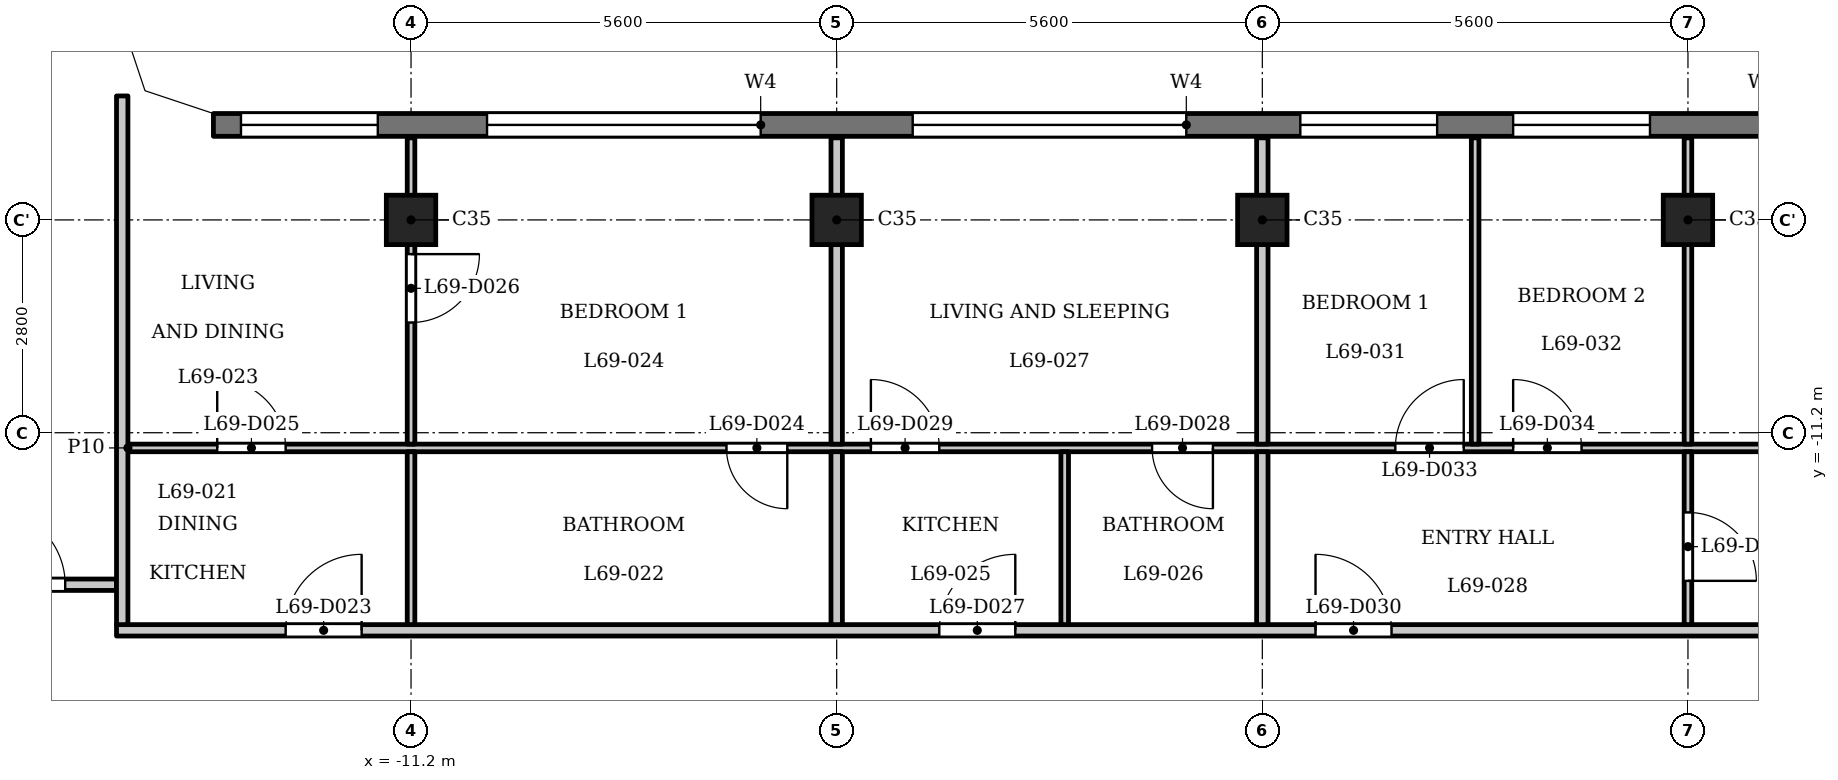
"""IFC4 building model, lengths in metres.
Left out: names, types, materials, properties, quantities, classifications, styles, units other than length and angle.
Written with IfcOpenShell. Run it as: python <this file> out.ifc"""

import sys

from ifc_helpers import new_model, si_unit, direction, frame, frame_2d, origin, origin_2d, place, context, subcontext, project, spatial, polyline, rectangle, outline, extrude, element, fill, save


model = new_model("IFC4")
c1 = context("Model", 3, precision=1e-05, world=origin(), true_north=direction((0.0, 1.0)))
c2 = subcontext(c1, "Body", "Model", "MODEL_VIEW")
j1 = project(units=[si_unit("LENGTHUNIT", "METRE"), si_unit("PLANEANGLEUNIT", "RADIAN")], contexts=[c1])
p1 = place(None, origin())
s1 = spatial("IfcSite", under=j1, at=p1, CompositionType="ELEMENT")
p2 = place(p1, origin())
s2 = spatial("IfcBuilding", under=s1, at=p2, CompositionType="ELEMENT")
p3 = place(p2, frame((0.0, 0.0, 266.2)))
s3 = spatial("IfcBuildingStorey", under=s2, at=p3, CompositionType="ELEMENT", Elevation=266.2)
for number, where, z_axis, x_axis in (
    (1, (-11.2, -8.4, 0.0), (0.0, 0.0, 1.0), (1.0, 0.0, 0.0)),
    (2, (-5.6, -8.4, 0.0), (0.0, 0.0, 1.0), (1.0, 0.0, 0.0)),
    (3, (0.0, -8.4, 0.0), (0.0, 0.0, 1.0), (1.0, 0.0, 0.0)),
    (4, (5.6, -8.4, 0.0), (0.0, 0.0, 1.0), (1.0, 0.0, 0.0)),
):
    element("IfcColumn", number, at=place(p3, frame(where, z_axis=z_axis, x_axis=x_axis)), inside=s3, PredefinedType="COLUMN", context=c2, shape_type="SweptSolid", body=[
        extrude(rectangle(XDim=0.65, YDim=0.65, at=origin_2d()), origin(), (0.0, 0.0, 1.0), 3.5),
    ])
p4 = place(p3, frame((13.8, -7.15, 0.0), z_axis=(0.0, 0.0, 1.0), x_axis=(-1.0, 0.0, 0.0)))
e5 = element("IfcWall", 5, at=p4, inside=s3, PredefinedType="SOLIDWALL", context=c2, shape_type="SweptSolid", body=[
    extrude(rectangle(XDim=27.6, YDim=0.3, at=frame_2d((13.8, 0.0))), origin(), (0.0, 0.0, 1.0), 3.2),
])
p5 = place(p4, frame((0.363, 0.0, 0.9)))
e6 = element("IfcOpeningElement", 6, at=p5, cuts=e5, PredefinedType="OPENING", context=c2, shape_type="SweptSolid", body=[
    extrude(rectangle(XDim=1.8, YDim=1.25, at=frame_2d((0.9, 0.625))), frame((0.0, 0.16, 0.0), z_axis=(0.0, -1.0, 0.0), x_axis=(1.0, 0.0, 0.0)), (0.0, 0.0, 1.0), 0.32),
])
p6 = place(p4, frame((3.6, 0.0, 1.2)))
e7 = element("IfcOpeningElement", 7, at=p6, cuts=e5, PredefinedType="OPENING", context=c2, shape_type="SweptSolid", body=[
    extrude(rectangle(XDim=3.6, YDim=0.95, at=frame_2d((1.8, 0.475))), frame((0.0, 0.16, 0.0), z_axis=(0.0, -1.0, 0.0), x_axis=(1.0, 0.0, 0.0)), (0.0, 0.0, 1.0), 0.32),
])
p7 = place(p4, frame((8.7, 0.0, 0.9)))
e8 = element("IfcOpeningElement", 8, at=p7, cuts=e5, PredefinedType="OPENING", context=c2, shape_type="SweptSolid", body=[
    extrude(rectangle(XDim=1.8, YDim=1.25, at=frame_2d((0.9, 0.625))), frame((0.0, 0.16, 0.0), z_axis=(0.0, -1.0, 0.0), x_axis=(1.0, 0.0, 0.0)), (0.0, 0.0, 1.0), 0.32),
])
p8 = place(p4, frame((11.5, 0.0, 0.9)))
e9 = element("IfcOpeningElement", 9, at=p8, cuts=e5, PredefinedType="OPENING", context=c2, shape_type="SweptSolid", body=[
    extrude(rectangle(XDim=1.8, YDim=1.25, at=frame_2d((0.9, 0.625))), frame((0.0, 0.16, 0.0), z_axis=(0.0, -1.0, 0.0), x_axis=(1.0, 0.0, 0.0)), (0.0, 0.0, 1.0), 0.32),
])
p9 = place(p4, frame((14.8, 0.0, 1.2)))
e10 = element("IfcOpeningElement", 10, at=p9, cuts=e5, PredefinedType="OPENING", context=c2, shape_type="SweptSolid", body=[
    extrude(rectangle(XDim=3.6, YDim=0.95, at=frame_2d((1.8, 0.475))), frame((0.0, 0.16, 0.0), z_axis=(0.0, -1.0, 0.0), x_axis=(1.0, 0.0, 0.0)), (0.0, 0.0, 1.0), 0.32),
])
p10 = place(p4, frame((20.4, 0.0, 1.2)))
e11 = element("IfcOpeningElement", 11, at=p10, cuts=e5, PredefinedType="OPENING", context=c2, shape_type="SweptSolid", body=[
    extrude(rectangle(XDim=3.6, YDim=0.95, at=frame_2d((1.8, 0.475))), frame((0.0, 0.16, 0.0), z_axis=(0.0, -1.0, 0.0), x_axis=(1.0, 0.0, 0.0)), (0.0, 0.0, 1.0), 0.32),
])
p11 = place(p4, frame((25.438, 0.0, 0.9)))
e12 = element("IfcOpeningElement", 12, at=p11, cuts=e5, PredefinedType="OPENING", context=c2, shape_type="SweptSolid", body=[
    extrude(rectangle(XDim=1.8, YDim=1.25, at=frame_2d((0.9, 0.625))), frame((0.0, 0.16, 0.0), z_axis=(0.0, -1.0, 0.0), x_axis=(1.0, 0.0, 0.0)), (0.0, 0.0, 1.0), 0.32),
])
p12 = place(p3, frame((-15.075, -13.8, 0.0), z_axis=(0.0, 0.0, 1.0), x_axis=(1.0, 0.0, 0.0)))
e13 = element("IfcWall", 13, at=p12, inside=s3, PredefinedType="PARTITIONING", context=c2, shape_type="SweptSolid", body=[
    extrude(rectangle(XDim=30.15, YDim=0.15, at=frame_2d((15.075, 0.0))), origin(), (0.0, 0.0, 1.0), 3.2),
])
p13 = place(p12, frame((2.225, 0.0, 0.0)))
e14 = element("IfcOpeningElement", 14, at=p13, cuts=e13, PredefinedType="OPENING", context=c2, shape_type="SweptSolid", body=[
    extrude(rectangle(XDim=1.0, YDim=2.1, at=frame_2d((0.5, 1.05))), frame((0.0, 0.085, 0.0), z_axis=(0.0, -1.0, 0.0), x_axis=(1.0, 0.0, 0.0)), (0.0, 0.0, 1.0), 0.17),
])
p14 = place(p12, frame((10.825, 0.0, 0.0)))
e15 = element("IfcOpeningElement", 15, at=p14, cuts=e13, PredefinedType="OPENING", context=c2, shape_type="SweptSolid", body=[
    extrude(rectangle(XDim=1.0, YDim=2.1, at=frame_2d((0.5, 1.05))), frame((0.0, 0.085, 0.0), z_axis=(0.0, -1.0, 0.0), x_axis=(1.0, 0.0, 0.0)), (0.0, 0.0, 1.0), 0.17),
])
p15 = place(p12, frame((15.775, 0.0, 0.0)))
e16 = element("IfcOpeningElement", 16, at=p15, cuts=e13, PredefinedType="OPENING", context=c2, shape_type="SweptSolid", body=[
    extrude(rectangle(XDim=1.0, YDim=2.1, at=frame_2d((0.5, 1.05))), frame((0.0, 0.085, 0.0), z_axis=(0.0, -1.0, 0.0), x_axis=(1.0, 0.0, 0.0)), (0.0, 0.0, 1.0), 0.17),
])
p16 = place(p3, frame((-17.4, -13.2, 0.0), z_axis=(0.0, 0.0, 1.0), x_axis=(1.0, 0.0, 0.0)))
e17 = element("IfcWall", 17, at=p16, inside=s3, PredefinedType="PARTITIONING", context=c2, shape_type="SweptSolid", body=[
    extrude(rectangle(XDim=2.325, YDim=0.15, at=frame_2d((1.163, 0.0))), origin(), (0.0, 0.0, 1.0), 3.2),
])
p17 = place(p16, frame((0.65, 0.0, 0.0)))
e18 = element("IfcOpeningElement", 18, at=p17, cuts=e17, PredefinedType="OPENING", context=c2, shape_type="SweptSolid", body=[
    extrude(rectangle(XDim=1.0, YDim=2.1, at=frame_2d((0.5, 1.05))), frame((0.0, 0.085, 0.0), z_axis=(0.0, -1.0, 0.0), x_axis=(1.0, 0.0, 0.0)), (0.0, 0.0, 1.0), 0.17),
])
p18 = place(p3, frame((-14.925, -11.4, 0.0), z_axis=(0.0, 0.0, 1.0), x_axis=(1.0, 0.0, 0.0)))
e19 = element("IfcWall", 19, at=p18, inside=s3, PredefinedType="PARTITIONING", context=c2, shape_type="SweptSolid", body=[
    extrude(rectangle(XDim=29.85, YDim=0.1, at=frame_2d((14.925, 0.0))), origin(), (0.0, 0.0, 1.0), 3.2),
])
p19 = place(p18, frame((7.875, 0.0, 0.0)))
e20 = element("IfcOpeningElement", 20, at=p19, cuts=e19, PredefinedType="OPENING", context=c2, shape_type="SweptSolid", body=[
    extrude(rectangle(XDim=0.8, YDim=2.1, at=frame_2d((0.4, 1.05))), frame((0.0, 0.06, 0.0), z_axis=(0.0, -1.0, 0.0), x_axis=(1.0, 0.0, 0.0)), (0.0, 0.0, 1.0), 0.12),
])
p20 = place(p18, frame((1.175, 0.0, 0.0)))
e21 = element("IfcOpeningElement", 21, at=p20, cuts=e19, PredefinedType="OPENING", context=c2, shape_type="SweptSolid", body=[
    extrude(rectangle(XDim=0.9, YDim=2.1, at=frame_2d((0.45, 1.05))), frame((0.0, 0.06, 0.0), z_axis=(0.0, -1.0, 0.0), x_axis=(1.0, 0.0, 0.0)), (0.0, 0.0, 1.0), 0.12),
])
p21 = place(p18, frame((13.475, 0.0, 0.0)))
e22 = element("IfcOpeningElement", 22, at=p21, cuts=e19, PredefinedType="OPENING", context=c2, shape_type="SweptSolid", body=[
    extrude(rectangle(XDim=0.8, YDim=2.1, at=frame_2d((0.4, 1.05))), frame((0.0, 0.06, 0.0), z_axis=(0.0, -1.0, 0.0), x_axis=(1.0, 0.0, 0.0)), (0.0, 0.0, 1.0), 0.12),
])
p22 = place(p18, frame((9.775, 0.0, 0.0)))
e23 = element("IfcOpeningElement", 23, at=p22, cuts=e19, PredefinedType="OPENING", context=c2, shape_type="SweptSolid", body=[
    extrude(rectangle(XDim=0.9, YDim=2.1, at=frame_2d((0.45, 1.05))), frame((0.0, 0.06, 0.0), z_axis=(0.0, -1.0, 0.0), x_axis=(1.0, 0.0, 0.0)), (0.0, 0.0, 1.0), 0.12),
])
p23 = place(p18, frame((16.675, 0.0, 0.0)))
e24 = element("IfcOpeningElement", 24, at=p23, cuts=e19, PredefinedType="OPENING", context=c2, shape_type="SweptSolid", body=[
    extrude(rectangle(XDim=0.9, YDim=2.1, at=frame_2d((0.45, 1.05))), frame((0.0, 0.06, 0.0), z_axis=(0.0, -1.0, 0.0), x_axis=(1.0, 0.0, 0.0)), (0.0, 0.0, 1.0), 0.12),
])
p24 = place(p18, frame((18.225, 0.0, 0.0)))
e25 = element("IfcOpeningElement", 25, at=p24, cuts=e19, PredefinedType="OPENING", context=c2, shape_type="SweptSolid", body=[
    extrude(rectangle(XDim=0.9, YDim=2.1, at=frame_2d((0.45, 1.05))), frame((0.0, 0.06, 0.0), z_axis=(0.0, -1.0, 0.0), x_axis=(1.0, 0.0, 0.0)), (0.0, 0.0, 1.0), 0.12),
])
p25 = place(p18, frame((24.325, 0.0, 0.0)))
e26 = element("IfcOpeningElement", 26, at=p25, cuts=e19, PredefinedType="OPENING", context=c2, shape_type="SweptSolid", body=[
    extrude(rectangle(XDim=0.9, YDim=2.1, at=frame_2d((0.45, 1.05))), frame((0.0, 0.06, 0.0), z_axis=(0.0, -1.0, 0.0), x_axis=(1.0, 0.0, 0.0)), (0.0, 0.0, 1.0), 0.12),
])
p26 = place(p3, frame((-15.0, -13.725, 0.0), z_axis=(0.0, 0.0, 1.0), x_axis=(0.0, 1.0, 0.0)))
e27 = element("IfcWall", 27, at=p26, inside=s3, PredefinedType="PARTITIONING", context=c2, shape_type="SweptSolid", body=[
    extrude(rectangle(XDim=6.956, YDim=0.15, at=frame_2d((3.478, 0.0))), origin(), (0.0, 0.0, 1.0), 3.2),
])
p27 = place(p3, frame((-11.2, -13.725, 0.0), z_axis=(0.0, 0.0, 1.0), x_axis=(0.0, 1.0, 0.0)))
e28 = element("IfcWall", 28, at=p27, inside=s3, PredefinedType="PARTITIONING", context=c2, shape_type="SweptSolid", body=[
    extrude(rectangle(XDim=2.275, YDim=0.1, at=frame_2d((1.138, 0.0))), origin(), (0.0, 0.0, 1.0), 3.2),
])
p28 = place(p3, frame((-11.2, -11.35, 0.0), z_axis=(0.0, 0.0, 1.0), x_axis=(0.0, 1.0, 0.0)))
e29 = element("IfcWall", 29, at=p28, inside=s3, PredefinedType="PARTITIONING", context=c2, shape_type="SweptSolid", body=[
    extrude(rectangle(XDim=4.03, YDim=0.1, at=frame_2d((2.015, 0.0))), origin(), (0.0, 0.0, 1.0), 3.2),
])
p29 = place(p28, frame((1.6, 0.0, 0.0)))
e30 = element("IfcOpeningElement", 30, at=p29, cuts=e29, PredefinedType="OPENING", context=c2, shape_type="SweptSolid", body=[
    extrude(rectangle(XDim=0.9, YDim=2.1, at=frame_2d((0.45, 1.05))), frame((0.0, 0.06, 0.0), z_axis=(0.0, -1.0, 0.0), x_axis=(1.0, 0.0, 0.0)), (0.0, 0.0, 1.0), 0.12),
])
p30 = place(p3, frame((-5.6, -13.725, 0.0), z_axis=(0.0, 0.0, 1.0), x_axis=(0.0, 1.0, 0.0)))
e31 = element("IfcWall", 31, at=p30, inside=s3, PredefinedType="PARTITIONING", context=c2, shape_type="SweptSolid", body=[
    extrude(rectangle(XDim=2.275, YDim=0.15, at=frame_2d((1.138, 0.0))), origin(), (0.0, 0.0, 1.0), 3.2),
])
p31 = place(p3, frame((-5.6, -11.35, 0.0), z_axis=(0.0, 0.0, 1.0), x_axis=(0.0, 1.0, 0.0)))
e32 = element("IfcWall", 32, at=p31, inside=s3, PredefinedType="PARTITIONING", context=c2, shape_type="SweptSolid", body=[
    extrude(rectangle(XDim=4.03, YDim=0.15, at=frame_2d((2.015, 0.0))), origin(), (0.0, 0.0, 1.0), 3.2),
])
p32 = place(p3, frame((-2.6, -13.725, 0.0), z_axis=(0.0, 0.0, 1.0), x_axis=(0.0, 1.0, 0.0)))
e33 = element("IfcWall", 33, at=p32, inside=s3, PredefinedType="PARTITIONING", context=c2, shape_type="SweptSolid", body=[
    extrude(rectangle(XDim=2.275, YDim=0.1, at=frame_2d((1.138, 0.0))), origin(), (0.0, 0.0, 1.0), 3.2),
])
p33 = place(p3, frame((0.0, -13.725, 0.0), z_axis=(0.0, 0.0, 1.0), x_axis=(0.0, 1.0, 0.0)))
e34 = element("IfcWall", 34, at=p33, inside=s3, PredefinedType="PARTITIONING", context=c2, shape_type="SweptSolid", body=[
    extrude(rectangle(XDim=2.275, YDim=0.15, at=frame_2d((1.138, 0.0))), origin(), (0.0, 0.0, 1.0), 3.2),
])
p34 = place(p3, frame((0.0, -11.35, 0.0), z_axis=(0.0, 0.0, 1.0), x_axis=(0.0, 1.0, 0.0)))
e35 = element("IfcWall", 35, at=p34, inside=s3, PredefinedType="PARTITIONING", context=c2, shape_type="SweptSolid", body=[
    extrude(rectangle(XDim=4.03, YDim=0.15, at=frame_2d((2.015, 0.0))), origin(), (0.0, 0.0, 1.0), 3.2),
])
p35 = place(p3, frame((2.8, -11.35, 0.0), z_axis=(0.0, 0.0, 1.0), x_axis=(0.0, 1.0, 0.0)))
e36 = element("IfcWall", 36, at=p35, inside=s3, PredefinedType="PARTITIONING", context=c2, shape_type="SweptSolid", body=[
    extrude(rectangle(XDim=4.03, YDim=0.1, at=frame_2d((2.015, 0.0))), origin(), (0.0, 0.0, 1.0), 3.2),
])
p36 = place(p3, frame((5.6, -13.725, 0.0), z_axis=(0.0, 0.0, 1.0), x_axis=(0.0, 1.0, 0.0)))
e37 = element("IfcWall", 37, at=p36, inside=s3, PredefinedType="PARTITIONING", context=c2, shape_type="SweptSolid", body=[
    extrude(rectangle(XDim=2.275, YDim=0.1, at=frame_2d((1.138, 0.0))), origin(), (0.0, 0.0, 1.0), 3.2),
])
p37 = place(p36, frame((0.576, 0.0, 0.0)))
e38 = element("IfcOpeningElement", 38, at=p37, cuts=e37, PredefinedType="OPENING", context=c2, shape_type="SweptSolid", body=[
    extrude(rectangle(XDim=0.9, YDim=2.1, at=frame_2d((0.45, 1.05))), frame((0.0, 0.06, 0.0), z_axis=(0.0, -1.0, 0.0), x_axis=(1.0, 0.0, 0.0)), (0.0, 0.0, 1.0), 0.12),
])
p38 = place(p3, frame((5.6, -11.35, 0.0), z_axis=(0.0, 0.0, 1.0), x_axis=(0.0, 1.0, 0.0)))
e39 = element("IfcWall", 39, at=p38, inside=s3, PredefinedType="PARTITIONING", context=c2, shape_type="SweptSolid", body=[
    extrude(rectangle(XDim=4.03, YDim=0.1, at=frame_2d((2.015, 0.0))), origin(), (0.0, 0.0, 1.0), 3.2),
])
p39 = place(p3, origin())
e40 = element("IfcWall", 40, at=p39, inside=s3, PredefinedType="SOLIDWALL", context=c2, shape_type="SweptSolid", body=[
    extrude(outline(polyline([(-14.937, -6.937), (-13.849, -7.3), (-13.8, -7.3), (-13.8, -7.0), (-14.7, -6.7), (-15.0, -5.8), (-15.3, -5.8), (-15.3, -5.849), (-14.937, -6.937)])), origin(), (0.0, 0.0, 1.0), 3.2),
])
p40 = place(p17, origin())
e41 = element("IfcDoor", 41, at=p40, inside=s3, OperationType="SINGLE_SWING_RIGHT", PredefinedType="DOOR", context=c2, shape_type="SweptSolid", body=[
    extrude(rectangle(XDim=1.0, YDim=2.1, at=frame_2d((0.5, 1.05))), frame((0.0, 0.025, 0.0), z_axis=(0.0, -1.0, 0.0), x_axis=(1.0, 0.0, 0.0)), (0.0, 0.0, 1.0), 0.05),
])
fill(e18, e41)
p41 = place(p13, origin())
e42 = element("IfcDoor", 42, at=p41, inside=s3, OperationType="SINGLE_SWING_LEFT", PredefinedType="DOOR", context=c2, shape_type="SweptSolid", body=[
    extrude(rectangle(XDim=1.0, YDim=2.1, at=frame_2d((0.5, 1.05))), frame((0.0, 0.025, 0.0), z_axis=(0.0, -1.0, 0.0), x_axis=(1.0, 0.0, 0.0)), (0.0, 0.0, 1.0), 0.05),
])
fill(e14, e42)
p42 = place(p19, origin())
e43 = element("IfcDoor", 43, at=p42, inside=s3, OperationType="SINGLE_SWING_RIGHT", PredefinedType="DOOR", context=c2, shape_type="SweptSolid", body=[
    extrude(rectangle(XDim=0.8, YDim=2.1, at=frame_2d((0.4, 1.05))), frame((0.0, 0.025, 0.0), z_axis=(0.0, -1.0, 0.0), x_axis=(1.0, 0.0, 0.0)), (0.0, 0.0, 1.0), 0.05),
])
fill(e20, e43)
p43 = place(p20, origin())
e44 = element("IfcDoor", 44, at=p43, inside=s3, OperationType="SINGLE_SWING_RIGHT", PredefinedType="DOOR", context=c2, shape_type="SweptSolid", body=[
    extrude(rectangle(XDim=0.9, YDim=2.1, at=frame_2d((0.45, 1.05))), frame((0.0, 0.025, 0.0), z_axis=(0.0, -1.0, 0.0), x_axis=(1.0, 0.0, 0.0)), (0.0, 0.0, 1.0), 0.05),
])
fill(e21, e44)
p44 = place(p29, origin())
e45 = element("IfcDoor", 45, at=p44, inside=s3, OperationType="SINGLE_SWING_RIGHT", PredefinedType="DOOR", context=c2, shape_type="SweptSolid", body=[
    extrude(rectangle(XDim=0.9, YDim=2.1, at=frame_2d((0.45, 1.05))), frame((0.0, 0.025, 0.0), z_axis=(0.0, -1.0, 0.0), x_axis=(1.0, 0.0, 0.0)), (0.0, 0.0, 1.0), 0.05),
])
fill(e30, e45)
p45 = place(p14, origin())
e46 = element("IfcDoor", 46, at=p45, inside=s3, OperationType="SINGLE_SWING_LEFT", PredefinedType="DOOR", context=c2, shape_type="SweptSolid", body=[
    extrude(rectangle(XDim=1.0, YDim=2.1, at=frame_2d((0.5, 1.05))), frame((0.0, 0.025, 0.0), z_axis=(0.0, -1.0, 0.0), x_axis=(1.0, 0.0, 0.0)), (0.0, 0.0, 1.0), 0.05),
])
fill(e15, e46)
p46 = place(p21, origin())
e47 = element("IfcDoor", 47, at=p46, inside=s3, OperationType="SINGLE_SWING_RIGHT", PredefinedType="DOOR", context=c2, shape_type="SweptSolid", body=[
    extrude(rectangle(XDim=0.8, YDim=2.1, at=frame_2d((0.4, 1.05))), frame((0.0, 0.025, 0.0), z_axis=(0.0, -1.0, 0.0), x_axis=(1.0, 0.0, 0.0)), (0.0, 0.0, 1.0), 0.05),
])
fill(e22, e47)
p47 = place(p22, origin())
e48 = element("IfcDoor", 48, at=p47, inside=s3, OperationType="SINGLE_SWING_RIGHT", PredefinedType="DOOR", context=c2, shape_type="SweptSolid", body=[
    extrude(rectangle(XDim=0.9, YDim=2.1, at=frame_2d((0.45, 1.05))), frame((0.0, 0.025, 0.0), z_axis=(0.0, -1.0, 0.0), x_axis=(1.0, 0.0, 0.0)), (0.0, 0.0, 1.0), 0.05),
])
fill(e23, e48)
p48 = place(p15, origin())
e49 = element("IfcDoor", 49, at=p48, inside=s3, OperationType="SINGLE_SWING_RIGHT", PredefinedType="DOOR", context=c2, shape_type="SweptSolid", body=[
    extrude(rectangle(XDim=1.0, YDim=2.1, at=frame_2d((0.5, 1.05))), frame((0.0, 0.025, 0.0), z_axis=(0.0, -1.0, 0.0), x_axis=(1.0, 0.0, 0.0)), (0.0, 0.0, 1.0), 0.05),
])
fill(e16, e49)
p49 = place(p37, origin())
e50 = element("IfcDoor", 50, at=p49, inside=s3, OperationType="SINGLE_SWING_LEFT", PredefinedType="DOOR", context=c2, shape_type="SweptSolid", body=[
    extrude(rectangle(XDim=0.9, YDim=2.1, at=frame_2d((0.45, 1.05))), frame((0.0, 0.025, 0.0), z_axis=(0.0, -1.0, 0.0), x_axis=(1.0, 0.0, 0.0)), (0.0, 0.0, 1.0), 0.05),
])
fill(e38, e50)
p50 = place(p23, origin())
e51 = element("IfcDoor", 51, at=p50, inside=s3, OperationType="SINGLE_SWING_LEFT", PredefinedType="DOOR", context=c2, shape_type="SweptSolid", body=[
    extrude(rectangle(XDim=0.9, YDim=2.1, at=frame_2d((0.45, 1.05))), frame((0.0, 0.025, 0.0), z_axis=(0.0, -1.0, 0.0), x_axis=(1.0, 0.0, 0.0)), (0.0, 0.0, 1.0), 0.05),
])
fill(e24, e51)
p51 = place(p24, origin())
e52 = element("IfcDoor", 52, at=p51, inside=s3, OperationType="SINGLE_SWING_RIGHT", PredefinedType="DOOR", context=c2, shape_type="SweptSolid", body=[
    extrude(rectangle(XDim=0.9, YDim=2.1, at=frame_2d((0.45, 1.05))), frame((0.0, 0.025, 0.0), z_axis=(0.0, -1.0, 0.0), x_axis=(1.0, 0.0, 0.0)), (0.0, 0.0, 1.0), 0.05),
])
fill(e25, e52)
p52 = place(p7, origin())
e53 = element("IfcWindow", 53, at=p52, inside=s3, PartitioningType="SINGLE_PANEL", PredefinedType="WINDOW", context=c2, shape_type="SweptSolid", body=[
    extrude(rectangle(XDim=1.8, YDim=1.25, at=frame_2d((0.9, 0.625))), frame((0.0, 0.03, 0.0), z_axis=(0.0, -1.0, 0.0), x_axis=(1.0, 0.0, 0.0)), (0.0, 0.0, 1.0), 0.06),
])
fill(e8, e53)
p53 = place(p8, origin())
e54 = element("IfcWindow", 54, at=p53, inside=s3, PartitioningType="SINGLE_PANEL", PredefinedType="WINDOW", context=c2, shape_type="SweptSolid", body=[
    extrude(rectangle(XDim=1.8, YDim=1.25, at=frame_2d((0.9, 0.625))), frame((0.0, 0.03, 0.0), z_axis=(0.0, -1.0, 0.0), x_axis=(1.0, 0.0, 0.0)), (0.0, 0.0, 1.0), 0.06),
])
fill(e9, e54)
p54 = place(p9, origin())
e55 = element("IfcWindow", 55, at=p54, inside=s3, PartitioningType="SINGLE_PANEL", PredefinedType="WINDOW", context=c2, shape_type="SweptSolid", body=[
    extrude(rectangle(XDim=3.6, YDim=0.95, at=frame_2d((1.8, 0.475))), frame((0.0, 0.03, 0.0), z_axis=(0.0, -1.0, 0.0), x_axis=(1.0, 0.0, 0.0)), (0.0, 0.0, 1.0), 0.06),
])
fill(e10, e55)
p55 = place(p10, origin())
e56 = element("IfcWindow", 56, at=p55, inside=s3, PartitioningType="SINGLE_PANEL", PredefinedType="WINDOW", context=c2, shape_type="SweptSolid", body=[
    extrude(rectangle(XDim=3.6, YDim=0.95, at=frame_2d((1.8, 0.475))), frame((0.0, 0.03, 0.0), z_axis=(0.0, -1.0, 0.0), x_axis=(1.0, 0.0, 0.0)), (0.0, 0.0, 1.0), 0.06),
])
fill(e11, e56)
p56 = place(p11, origin())
e57 = element("IfcWindow", 57, at=p56, inside=s3, PartitioningType="SINGLE_PANEL", PredefinedType="WINDOW", context=c2, shape_type="SweptSolid", body=[
    extrude(rectangle(XDim=1.8, YDim=1.25, at=frame_2d((0.9, 0.625))), frame((0.0, 0.03, 0.0), z_axis=(0.0, -1.0, 0.0), x_axis=(1.0, 0.0, 0.0)), (0.0, 0.0, 1.0), 0.06),
])
fill(e12, e57)
save(model, sys.argv[1])
